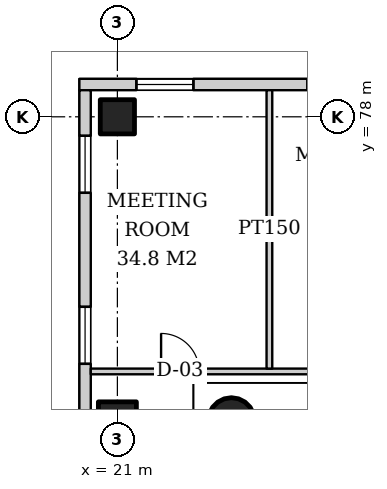
"""IFC4 building model, lengths in metres.
Left out: names, types, materials, properties, quantities, classifications, styles, units other than length and angle.
Written with IfcOpenShell. Run it as: python <this file> out.ifc"""

import sys

from ifc_helpers import new_model, si_unit, direction, frame, frame_2d, origin, origin_2d, place, context, subcontext, project, spatial, rectangle, hollow_circle, extrude, element, fill, save


model = new_model("IFC4")
c1 = context("Model", 3, precision=1e-05, world=origin(), true_north=direction((0.0, 1.0)))
c2 = subcontext(c1, "Body", "Model", "MODEL_VIEW")
j1 = project(units=[si_unit("LENGTHUNIT", "METRE"), si_unit("PLANEANGLEUNIT", "RADIAN")], contexts=[c1])
p1 = place(None, origin())
s1 = spatial("IfcSite", under=j1, at=p1, CompositionType="ELEMENT")
p2 = place(p1, origin())
s2 = spatial("IfcBuilding", under=s1, at=p2, CompositionType="ELEMENT")
p3 = place(p2, frame((0.0, 0.0, 11.0)))
s3 = spatial("IfcBuildingStorey", under=s2, at=p3, CompositionType="ELEMENT", Elevation=11.0)
p4 = place(p3, frame((21.0, 78.0, 0.0), z_axis=(0.0, 0.0, 1.0), x_axis=(1.0, 0.0, 0.0)))
e1 = element("IfcColumn", 1, at=p4, inside=s3, PredefinedType="COLUMN", context=c2, shape_type="SweptSolid", body=[
    extrude(rectangle(XDim=0.9, YDim=0.9, at=origin_2d()), origin(), (0.0, 0.0, 1.0), 5.0),
])
p5 = place(p3, frame((24.0, 70.0, 0.0), z_axis=(0.0, 0.0, 1.0), x_axis=(1.0, 0.0, 0.0)))
e2 = element("IfcColumn", 2, at=p5, inside=s3, PredefinedType="COLUMN", context=c2, shape_type="SweptSolid", body=[
    extrude(hollow_circle(Radius=0.61, WallThickness=0.04, at=origin_2d()), origin(), (0.0, 0.0, 1.0), 5.0),
])
p6 = place(p3, frame((21.0, 70.0, 0.0), z_axis=(0.0, 0.0, 1.0), x_axis=(1.0, 0.0, 0.0)))
e3 = element("IfcColumn", 3, at=p6, inside=s3, PredefinedType="COLUMN", context=c2, shape_type="SweptSolid", body=[
    extrude(rectangle(XDim=1.0, YDim=1.0, at=origin_2d()), origin(), (0.0, 0.0, 1.0), 5.0),
])
p7 = place(p3, frame((78.0, 78.85, 0.0), z_axis=(0.0, 0.0, 1.0), x_axis=(-1.0, 0.0, 0.0)))
e4 = element("IfcWall", 4, at=p7, inside=s3, PredefinedType="SOLIDWALL", context=c2, shape_type="SweptSolid", body=[
    extrude(rectangle(XDim=58.0, YDim=0.3, at=frame_2d((29.0, 0.0))), origin(), (0.0, 0.0, 1.0), 4.7),
])
p8 = place(p7, frame((1.5, 0.0, 0.9)))
e5 = element("IfcOpeningElement", 5, at=p8, cuts=e4, PredefinedType="OPENING", context=c2, shape_type="SweptSolid", body=[
    extrude(rectangle(XDim=1.5, YDim=3.2, at=frame_2d((0.75, 1.6))), frame((0.0, 0.16, 0.0), z_axis=(0.0, -1.0, 0.0), x_axis=(1.0, 0.0, 0.0)), (0.0, 0.0, 1.0), 0.32),
])
p9 = place(p7, frame((6.0, 0.0, 0.9)))
e6 = element("IfcOpeningElement", 6, at=p9, cuts=e4, PredefinedType="OPENING", context=c2, shape_type="SweptSolid", body=[
    extrude(rectangle(XDim=1.5, YDim=3.2, at=frame_2d((0.75, 1.6))), frame((0.0, 0.16, 0.0), z_axis=(0.0, -1.0, 0.0), x_axis=(1.0, 0.0, 0.0)), (0.0, 0.0, 1.0), 0.32),
])
p10 = place(p7, frame((10.25, 0.0, 0.9)))
e7 = element("IfcOpeningElement", 7, at=p10, cuts=e4, PredefinedType="OPENING", context=c2, shape_type="SweptSolid", body=[
    extrude(rectangle(XDim=1.5, YDim=3.2, at=frame_2d((0.75, 1.6))), frame((0.0, 0.16, 0.0), z_axis=(0.0, -1.0, 0.0), x_axis=(1.0, 0.0, 0.0)), (0.0, 0.0, 1.0), 0.32),
])
p11 = place(p7, frame((14.25, 0.0, 0.9)))
e8 = element("IfcOpeningElement", 8, at=p11, cuts=e4, PredefinedType="OPENING", context=c2, shape_type="SweptSolid", body=[
    extrude(rectangle(XDim=1.5, YDim=3.2, at=frame_2d((0.75, 1.6))), frame((0.0, 0.16, 0.0), z_axis=(0.0, -1.0, 0.0), x_axis=(1.0, 0.0, 0.0)), (0.0, 0.0, 1.0), 0.32),
])
p12 = place(p7, frame((18.25, 0.0, 0.9)))
e9 = element("IfcOpeningElement", 9, at=p12, cuts=e4, PredefinedType="OPENING", context=c2, shape_type="SweptSolid", body=[
    extrude(rectangle(XDim=1.5, YDim=3.2, at=frame_2d((0.75, 1.6))), frame((0.0, 0.16, 0.0), z_axis=(0.0, -1.0, 0.0), x_axis=(1.0, 0.0, 0.0)), (0.0, 0.0, 1.0), 0.32),
])
p13 = place(p7, frame((22.25, 0.0, 0.9)))
e10 = element("IfcOpeningElement", 10, at=p13, cuts=e4, PredefinedType="OPENING", context=c2, shape_type="SweptSolid", body=[
    extrude(rectangle(XDim=1.5, YDim=3.2, at=frame_2d((0.75, 1.6))), frame((0.0, 0.16, 0.0), z_axis=(0.0, -1.0, 0.0), x_axis=(1.0, 0.0, 0.0)), (0.0, 0.0, 1.0), 0.32),
])
p14 = place(p7, frame((26.1, 0.0, 0.0)))
e11 = element("IfcOpeningElement", 11, at=p14, cuts=e4, PredefinedType="OPENING", context=c2, shape_type="SweptSolid", body=[
    extrude(rectangle(XDim=1.8, YDim=2.4, at=frame_2d((0.9, 1.2))), frame((0.0, 0.16, 0.0), z_axis=(0.0, -1.0, 0.0), x_axis=(1.0, 0.0, 0.0)), (0.0, 0.0, 1.0), 0.32),
])
p15 = place(p7, frame((30.25, 0.0, 0.9)))
e12 = element("IfcOpeningElement", 12, at=p15, cuts=e4, PredefinedType="OPENING", context=c2, shape_type="SweptSolid", body=[
    extrude(rectangle(XDim=1.5, YDim=3.2, at=frame_2d((0.75, 1.6))), frame((0.0, 0.16, 0.0), z_axis=(0.0, -1.0, 0.0), x_axis=(1.0, 0.0, 0.0)), (0.0, 0.0, 1.0), 0.32),
])
p16 = place(p7, frame((34.25, 0.0, 0.9)))
e13 = element("IfcOpeningElement", 13, at=p16, cuts=e4, PredefinedType="OPENING", context=c2, shape_type="SweptSolid", body=[
    extrude(rectangle(XDim=1.5, YDim=3.2, at=frame_2d((0.75, 1.6))), frame((0.0, 0.16, 0.0), z_axis=(0.0, -1.0, 0.0), x_axis=(1.0, 0.0, 0.0)), (0.0, 0.0, 1.0), 0.32),
])
p17 = place(p7, frame((38.25, 0.0, 0.9)))
e14 = element("IfcOpeningElement", 14, at=p17, cuts=e4, PredefinedType="OPENING", context=c2, shape_type="SweptSolid", body=[
    extrude(rectangle(XDim=1.5, YDim=3.2, at=frame_2d((0.75, 1.6))), frame((0.0, 0.16, 0.0), z_axis=(0.0, -1.0, 0.0), x_axis=(1.0, 0.0, 0.0)), (0.0, 0.0, 1.0), 0.32),
])
p18 = place(p7, frame((42.25, 0.0, 0.9)))
e15 = element("IfcOpeningElement", 15, at=p18, cuts=e4, PredefinedType="OPENING", context=c2, shape_type="SweptSolid", body=[
    extrude(rectangle(XDim=1.5, YDim=3.2, at=frame_2d((0.75, 1.6))), frame((0.0, 0.16, 0.0), z_axis=(0.0, -1.0, 0.0), x_axis=(1.0, 0.0, 0.0)), (0.0, 0.0, 1.0), 0.32),
])
p19 = place(p7, frame((46.25, 0.0, 0.9)))
e16 = element("IfcOpeningElement", 16, at=p19, cuts=e4, PredefinedType="OPENING", context=c2, shape_type="SweptSolid", body=[
    extrude(rectangle(XDim=1.5, YDim=3.2, at=frame_2d((0.75, 1.6))), frame((0.0, 0.16, 0.0), z_axis=(0.0, -1.0, 0.0), x_axis=(1.0, 0.0, 0.0)), (0.0, 0.0, 1.0), 0.32),
])
p20 = place(p7, frame((50.5, 0.0, 0.9)))
e17 = element("IfcOpeningElement", 17, at=p20, cuts=e4, PredefinedType="OPENING", context=c2, shape_type="SweptSolid", body=[
    extrude(rectangle(XDim=1.5, YDim=3.2, at=frame_2d((0.75, 1.6))), frame((0.0, 0.16, 0.0), z_axis=(0.0, -1.0, 0.0), x_axis=(1.0, 0.0, 0.0)), (0.0, 0.0, 1.0), 0.32),
])
p21 = place(p7, frame((55.0, 0.0, 0.9)))
e18 = element("IfcOpeningElement", 18, at=p21, cuts=e4, PredefinedType="OPENING", context=c2, shape_type="SweptSolid", body=[
    extrude(rectangle(XDim=1.5, YDim=3.2, at=frame_2d((0.75, 1.6))), frame((0.0, 0.16, 0.0), z_axis=(0.0, -1.0, 0.0), x_axis=(1.0, 0.0, 0.0)), (0.0, 0.0, 1.0), 0.32),
])
p22 = place(p3, frame((20.15, 78.7, 0.0), z_axis=(0.0, 0.0, 1.0), x_axis=(0.0, -1.0, 0.0)))
e19 = element("IfcWall", 19, at=p22, inside=s3, PredefinedType="SOLIDWALL", context=c2, shape_type="SweptSolid", body=[
    extrude(rectangle(XDim=57.4, YDim=0.3, at=frame_2d((28.7, 0.0))), origin(), (0.0, 0.0, 1.0), 4.7),
])
p23 = place(p22, frame((1.2, 0.0, 0.9)))
e20 = element("IfcOpeningElement", 20, at=p23, cuts=e19, PredefinedType="OPENING", context=c2, shape_type="SweptSolid", body=[
    extrude(rectangle(XDim=1.5, YDim=3.2, at=frame_2d((0.75, 1.6))), frame((0.0, 0.16, 0.0), z_axis=(0.0, -1.0, 0.0), x_axis=(1.0, 0.0, 0.0)), (0.0, 0.0, 1.0), 0.32),
])
p24 = place(p22, frame((5.7, 0.0, 0.9)))
e21 = element("IfcOpeningElement", 21, at=p24, cuts=e19, PredefinedType="OPENING", context=c2, shape_type="SweptSolid", body=[
    extrude(rectangle(XDim=1.5, YDim=3.2, at=frame_2d((0.75, 1.6))), frame((0.0, 0.16, 0.0), z_axis=(0.0, -1.0, 0.0), x_axis=(1.0, 0.0, 0.0)), (0.0, 0.0, 1.0), 0.32),
])
p25 = place(p22, frame((9.95, 0.0, 0.9)))
e22 = element("IfcOpeningElement", 22, at=p25, cuts=e19, PredefinedType="OPENING", context=c2, shape_type="SweptSolid", body=[
    extrude(rectangle(XDim=1.5, YDim=3.2, at=frame_2d((0.75, 1.6))), frame((0.0, 0.16, 0.0), z_axis=(0.0, -1.0, 0.0), x_axis=(1.0, 0.0, 0.0)), (0.0, 0.0, 1.0), 0.32),
])
p26 = place(p22, frame((13.95, 0.0, 0.9)))
e23 = element("IfcOpeningElement", 23, at=p26, cuts=e19, PredefinedType="OPENING", context=c2, shape_type="SweptSolid", body=[
    extrude(rectangle(XDim=1.5, YDim=3.2, at=frame_2d((0.75, 1.6))), frame((0.0, 0.16, 0.0), z_axis=(0.0, -1.0, 0.0), x_axis=(1.0, 0.0, 0.0)), (0.0, 0.0, 1.0), 0.32),
])
p27 = place(p22, frame((17.95, 0.0, 0.9)))
e24 = element("IfcOpeningElement", 24, at=p27, cuts=e19, PredefinedType="OPENING", context=c2, shape_type="SweptSolid", body=[
    extrude(rectangle(XDim=1.5, YDim=3.2, at=frame_2d((0.75, 1.6))), frame((0.0, 0.16, 0.0), z_axis=(0.0, -1.0, 0.0), x_axis=(1.0, 0.0, 0.0)), (0.0, 0.0, 1.0), 0.32),
])
p28 = place(p22, frame((21.95, 0.0, 0.9)))
e25 = element("IfcOpeningElement", 25, at=p28, cuts=e19, PredefinedType="OPENING", context=c2, shape_type="SweptSolid", body=[
    extrude(rectangle(XDim=1.5, YDim=3.2, at=frame_2d((0.75, 1.6))), frame((0.0, 0.16, 0.0), z_axis=(0.0, -1.0, 0.0), x_axis=(1.0, 0.0, 0.0)), (0.0, 0.0, 1.0), 0.32),
])
p29 = place(p22, frame((25.8, 0.0, 0.0)))
e26 = element("IfcOpeningElement", 26, at=p29, cuts=e19, PredefinedType="OPENING", context=c2, shape_type="SweptSolid", body=[
    extrude(rectangle(XDim=1.8, YDim=2.4, at=frame_2d((0.9, 1.2))), frame((0.0, 0.16, 0.0), z_axis=(0.0, -1.0, 0.0), x_axis=(1.0, 0.0, 0.0)), (0.0, 0.0, 1.0), 0.32),
])
p30 = place(p22, frame((29.95, 0.0, 0.9)))
e27 = element("IfcOpeningElement", 27, at=p30, cuts=e19, PredefinedType="OPENING", context=c2, shape_type="SweptSolid", body=[
    extrude(rectangle(XDim=1.5, YDim=3.2, at=frame_2d((0.75, 1.6))), frame((0.0, 0.16, 0.0), z_axis=(0.0, -1.0, 0.0), x_axis=(1.0, 0.0, 0.0)), (0.0, 0.0, 1.0), 0.32),
])
p31 = place(p22, frame((33.95, 0.0, 0.9)))
e28 = element("IfcOpeningElement", 28, at=p31, cuts=e19, PredefinedType="OPENING", context=c2, shape_type="SweptSolid", body=[
    extrude(rectangle(XDim=1.5, YDim=3.2, at=frame_2d((0.75, 1.6))), frame((0.0, 0.16, 0.0), z_axis=(0.0, -1.0, 0.0), x_axis=(1.0, 0.0, 0.0)), (0.0, 0.0, 1.0), 0.32),
])
p32 = place(p22, frame((37.95, 0.0, 0.9)))
e29 = element("IfcOpeningElement", 29, at=p32, cuts=e19, PredefinedType="OPENING", context=c2, shape_type="SweptSolid", body=[
    extrude(rectangle(XDim=1.5, YDim=3.2, at=frame_2d((0.75, 1.6))), frame((0.0, 0.16, 0.0), z_axis=(0.0, -1.0, 0.0), x_axis=(1.0, 0.0, 0.0)), (0.0, 0.0, 1.0), 0.32),
])
p33 = place(p22, frame((41.95, 0.0, 0.9)))
e30 = element("IfcOpeningElement", 30, at=p33, cuts=e19, PredefinedType="OPENING", context=c2, shape_type="SweptSolid", body=[
    extrude(rectangle(XDim=1.5, YDim=3.2, at=frame_2d((0.75, 1.6))), frame((0.0, 0.16, 0.0), z_axis=(0.0, -1.0, 0.0), x_axis=(1.0, 0.0, 0.0)), (0.0, 0.0, 1.0), 0.32),
])
p34 = place(p22, frame((45.95, 0.0, 0.9)))
e31 = element("IfcOpeningElement", 31, at=p34, cuts=e19, PredefinedType="OPENING", context=c2, shape_type="SweptSolid", body=[
    extrude(rectangle(XDim=1.5, YDim=3.2, at=frame_2d((0.75, 1.6))), frame((0.0, 0.16, 0.0), z_axis=(0.0, -1.0, 0.0), x_axis=(1.0, 0.0, 0.0)), (0.0, 0.0, 1.0), 0.32),
])
p35 = place(p22, frame((50.2, 0.0, 0.9)))
e32 = element("IfcOpeningElement", 32, at=p35, cuts=e19, PredefinedType="OPENING", context=c2, shape_type="SweptSolid", body=[
    extrude(rectangle(XDim=1.5, YDim=3.2, at=frame_2d((0.75, 1.6))), frame((0.0, 0.16, 0.0), z_axis=(0.0, -1.0, 0.0), x_axis=(1.0, 0.0, 0.0)), (0.0, 0.0, 1.0), 0.32),
])
p36 = place(p22, frame((54.7, 0.0, 0.9)))
e33 = element("IfcOpeningElement", 33, at=p36, cuts=e19, PredefinedType="OPENING", context=c2, shape_type="SweptSolid", body=[
    extrude(rectangle(XDim=1.5, YDim=3.2, at=frame_2d((0.75, 1.6))), frame((0.0, 0.16, 0.0), z_axis=(0.0, -1.0, 0.0), x_axis=(1.0, 0.0, 0.0)), (0.0, 0.0, 1.0), 0.32),
])
p37 = place(p3, frame((20.3, 71.3, 0.0), z_axis=(0.0, 0.0, 1.0), x_axis=(1.0, 0.0, 0.0)))
e34 = element("IfcWall", 34, at=p37, inside=s3, PredefinedType="PARTITIONING", context=c2, shape_type="SweptSolid", body=[
    extrude(rectangle(XDim=57.4, YDim=0.15, at=frame_2d((28.7, 0.0))), origin(), (0.0, 0.0, 1.0), 3.2),
])
p38 = place(p37, frame((1.85, 0.0, 0.0)))
e35 = element("IfcOpeningElement", 35, at=p38, cuts=e34, PredefinedType="OPENING", context=c2, shape_type="SweptSolid", body=[
    extrude(rectangle(XDim=1.0, YDim=2.1, at=frame_2d((0.5, 1.05))), frame((0.0, 0.085, 0.0), z_axis=(0.0, -1.0, 0.0), x_axis=(1.0, 0.0, 0.0)), (0.0, 0.0, 1.0), 0.17),
])
p39 = place(p37, frame((6.2, 0.0, 0.0)))
e36 = element("IfcOpeningElement", 36, at=p39, cuts=e34, PredefinedType="OPENING", context=c2, shape_type="SweptSolid", body=[
    extrude(rectangle(XDim=1.0, YDim=2.1, at=frame_2d((0.5, 1.05))), frame((0.0, 0.085, 0.0), z_axis=(0.0, -1.0, 0.0), x_axis=(1.0, 0.0, 0.0)), (0.0, 0.0, 1.0), 0.17),
])
p40 = place(p37, frame((10.2, 0.0, 0.0)))
e37 = element("IfcOpeningElement", 37, at=p40, cuts=e34, PredefinedType="OPENING", context=c2, shape_type="SweptSolid", body=[
    extrude(rectangle(XDim=1.0, YDim=2.1, at=frame_2d((0.5, 1.05))), frame((0.0, 0.085, 0.0), z_axis=(0.0, -1.0, 0.0), x_axis=(1.0, 0.0, 0.0)), (0.0, 0.0, 1.0), 0.17),
])
p41 = place(p37, frame((16.2, 0.0, 0.0)))
e38 = element("IfcOpeningElement", 38, at=p41, cuts=e34, PredefinedType="OPENING", context=c2, shape_type="SweptSolid", body=[
    extrude(rectangle(XDim=1.0, YDim=2.1, at=frame_2d((0.5, 1.05))), frame((0.0, 0.085, 0.0), z_axis=(0.0, -1.0, 0.0), x_axis=(1.0, 0.0, 0.0)), (0.0, 0.0, 1.0), 0.17),
])
p42 = place(p37, frame((22.2, 0.0, 0.0)))
e39 = element("IfcOpeningElement", 39, at=p42, cuts=e34, PredefinedType="OPENING", context=c2, shape_type="SweptSolid", body=[
    extrude(rectangle(XDim=1.0, YDim=2.1, at=frame_2d((0.5, 1.05))), frame((0.0, 0.085, 0.0), z_axis=(0.0, -1.0, 0.0), x_axis=(1.0, 0.0, 0.0)), (0.0, 0.0, 1.0), 0.17),
])
p43 = place(p37, frame((26.2, 0.0, 0.0)))
e40 = element("IfcOpeningElement", 40, at=p43, cuts=e34, PredefinedType="OPENING", context=c2, shape_type="SweptSolid", body=[
    extrude(rectangle(XDim=1.0, YDim=2.1, at=frame_2d((0.5, 1.05))), frame((0.0, 0.085, 0.0), z_axis=(0.0, -1.0, 0.0), x_axis=(1.0, 0.0, 0.0)), (0.0, 0.0, 1.0), 0.17),
])
p44 = place(p37, frame((32.2, 0.0, 0.0)))
e41 = element("IfcOpeningElement", 41, at=p44, cuts=e34, PredefinedType="OPENING", context=c2, shape_type="SweptSolid", body=[
    extrude(rectangle(XDim=1.0, YDim=2.1, at=frame_2d((0.5, 1.05))), frame((0.0, 0.085, 0.0), z_axis=(0.0, -1.0, 0.0), x_axis=(1.0, 0.0, 0.0)), (0.0, 0.0, 1.0), 0.17),
])
p45 = place(p37, frame((38.2, 0.0, 0.0)))
e42 = element("IfcOpeningElement", 42, at=p45, cuts=e34, PredefinedType="OPENING", context=c2, shape_type="SweptSolid", body=[
    extrude(rectangle(XDim=1.0, YDim=2.1, at=frame_2d((0.5, 1.05))), frame((0.0, 0.085, 0.0), z_axis=(0.0, -1.0, 0.0), x_axis=(1.0, 0.0, 0.0)), (0.0, 0.0, 1.0), 0.17),
])
p46 = place(p37, frame((42.2, 0.0, 0.0)))
e43 = element("IfcOpeningElement", 43, at=p46, cuts=e34, PredefinedType="OPENING", context=c2, shape_type="SweptSolid", body=[
    extrude(rectangle(XDim=1.0, YDim=2.1, at=frame_2d((0.5, 1.05))), frame((0.0, 0.085, 0.0), z_axis=(0.0, -1.0, 0.0), x_axis=(1.0, 0.0, 0.0)), (0.0, 0.0, 1.0), 0.17),
])
p47 = place(p37, frame((48.2, 0.0, 0.0)))
e44 = element("IfcOpeningElement", 44, at=p47, cuts=e34, PredefinedType="OPENING", context=c2, shape_type="SweptSolid", body=[
    extrude(rectangle(XDim=1.0, YDim=2.1, at=frame_2d((0.5, 1.05))), frame((0.0, 0.085, 0.0), z_axis=(0.0, -1.0, 0.0), x_axis=(1.0, 0.0, 0.0)), (0.0, 0.0, 1.0), 0.17),
])
p48 = place(p37, frame((54.55, 0.0, 0.0)))
e45 = element("IfcOpeningElement", 45, at=p48, cuts=e34, PredefinedType="OPENING", context=c2, shape_type="SweptSolid", body=[
    extrude(rectangle(XDim=1.0, YDim=2.1, at=frame_2d((0.5, 1.05))), frame((0.0, 0.085, 0.0), z_axis=(0.0, -1.0, 0.0), x_axis=(1.0, 0.0, 0.0)), (0.0, 0.0, 1.0), 0.17),
])
p49 = place(p3, frame((25.0, 71.375, 0.0), z_axis=(0.0, 0.0, 1.0), x_axis=(0.0, 1.0, 0.0)))
e46 = element("IfcWall", 46, at=p49, inside=s3, PredefinedType="PARTITIONING", context=c2, shape_type="SweptSolid", body=[
    extrude(rectangle(XDim=7.325, YDim=0.15, at=frame_2d((3.663, 0.0))), origin(), (0.0, 0.0, 1.0), 3.2),
])
p50 = place(p21, origin())
e47 = element("IfcWindow", 47, at=p50, inside=s3, PartitioningType="SINGLE_PANEL", PredefinedType="WINDOW", context=c2, shape_type="SweptSolid", body=[
    extrude(rectangle(XDim=1.5, YDim=3.2, at=frame_2d((0.75, 1.6))), frame((0.0, 0.03, 0.0), z_axis=(0.0, -1.0, 0.0), x_axis=(1.0, 0.0, 0.0)), (0.0, 0.0, 1.0), 0.06),
])
fill(e18, e47)
p51 = place(p23, origin())
e48 = element("IfcWindow", 48, at=p51, inside=s3, PartitioningType="SINGLE_PANEL", PredefinedType="WINDOW", context=c2, shape_type="SweptSolid", body=[
    extrude(rectangle(XDim=1.5, YDim=3.2, at=frame_2d((0.75, 1.6))), frame((0.0, 0.03, 0.0), z_axis=(0.0, -1.0, 0.0), x_axis=(1.0, 0.0, 0.0)), (0.0, 0.0, 1.0), 0.06),
])
fill(e20, e48)
p52 = place(p24, origin())
e49 = element("IfcWindow", 49, at=p52, inside=s3, PartitioningType="SINGLE_PANEL", PredefinedType="WINDOW", context=c2, shape_type="SweptSolid", body=[
    extrude(rectangle(XDim=1.5, YDim=3.2, at=frame_2d((0.75, 1.6))), frame((0.0, 0.03, 0.0), z_axis=(0.0, -1.0, 0.0), x_axis=(1.0, 0.0, 0.0)), (0.0, 0.0, 1.0), 0.06),
])
fill(e21, e49)
p53 = place(p38, origin())
e50 = element("IfcDoor", 50, at=p53, inside=s3, OperationType="SINGLE_SWING_LEFT", PredefinedType="DOOR", context=c2, shape_type="SweptSolid", body=[
    extrude(rectangle(XDim=1.0, YDim=2.1, at=frame_2d((0.5, 1.05))), frame((0.0, 0.025, 0.0), z_axis=(0.0, -1.0, 0.0), x_axis=(1.0, 0.0, 0.0)), (0.0, 0.0, 1.0), 0.05),
])
fill(e35, e50)
save(model, sys.argv[1])
